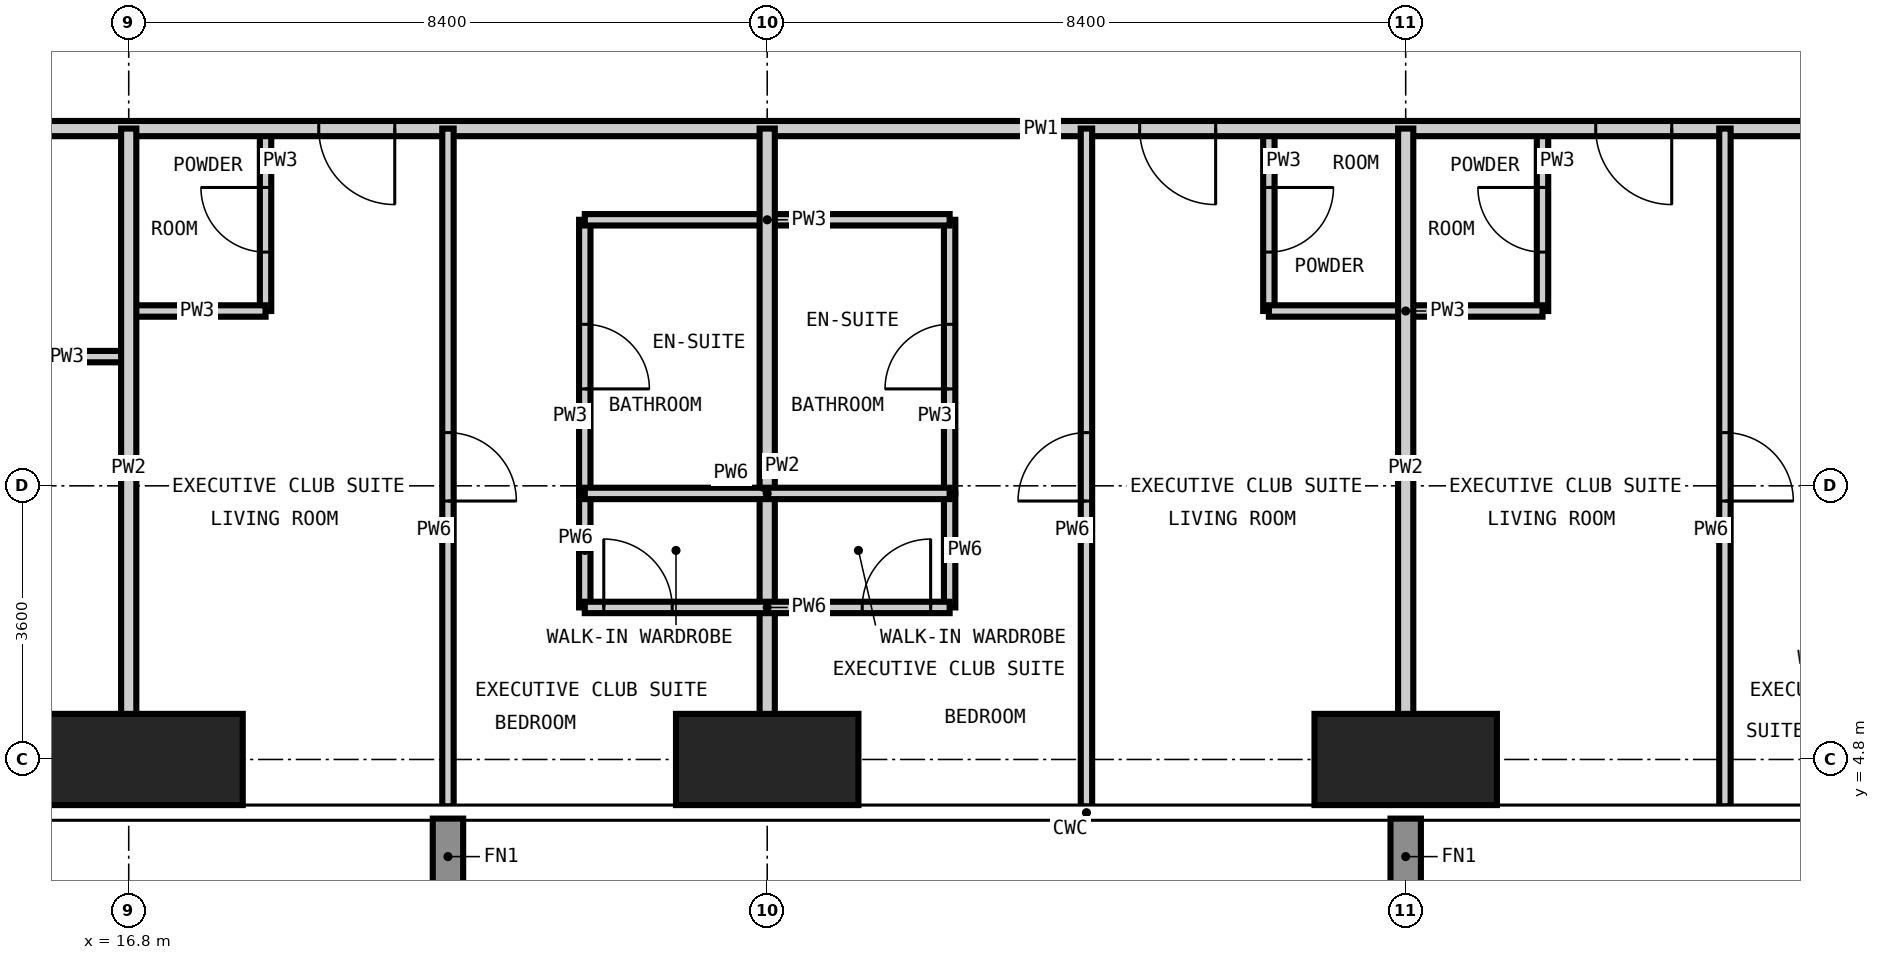
"""IFC4 building model, lengths in metres.
Left out: names, types, materials, properties, quantities, classifications, styles, units other than length and angle.
Written with IfcOpenShell. Run it as: python <this file> out.ifc"""

import sys

from ifc_helpers import new_model, si_unit, direction, frame, frame_2d, origin, origin_2d, place, context, subcontext, project, spatial, rectangle, extrude, element, fill, save


model = new_model("IFC4")
c1 = context("Model", 3, precision=1e-05, world=origin(), true_north=direction((0.0, 1.0)))
c2 = subcontext(c1, "Body", "Model", "MODEL_VIEW")
j1 = project(units=[si_unit("LENGTHUNIT", "METRE"), si_unit("PLANEANGLEUNIT", "RADIAN")], contexts=[c1])
p1 = place(None, origin())
s1 = spatial("IfcSite", under=j1, at=p1, CompositionType="ELEMENT")
p2 = place(p1, origin())
s2 = spatial("IfcBuilding", under=s1, at=p2, CompositionType="ELEMENT")
p3 = place(p2, frame((0.0, 0.0, 216.6)))
s3 = spatial("IfcBuildingStorey", under=s2, at=p3, CompositionType="ELEMENT", Elevation=216.6)
p4 = place(p3, frame((16.8, 4.8, -0.35), z_axis=(0.0, 0.0, 1.0), x_axis=(1.0, 0.0, 0.0)))
e1 = element("IfcColumn", 1, at=p4, inside=s3, PredefinedType="COLUMN", context=c2, shape_type="SweptSolid", body=[
    extrude(rectangle(XDim=3.0, YDim=1.2, at=origin_2d()), origin(), (0.0, 0.0, 1.0), 3.55),
])
for number, where, z_axis, x_axis in (
    (2, (25.2, 4.8, -0.35), (0.0, 0.0, 1.0), (1.0, 0.0, 0.0)),
    (3, (33.6, 4.8, -0.35), (0.0, 0.0, 1.0), (1.0, 0.0, 0.0)),
):
    element("IfcColumn", number, at=place(p3, frame(where, z_axis=z_axis, x_axis=x_axis)), inside=s3, PredefinedType="COLUMN", context=c2, shape_type="SweptSolid", body=[
        extrude(rectangle(XDim=2.4, YDim=1.2, at=origin_2d()), origin(), (0.0, 0.0, 1.0), 3.55),
    ])
p5 = place(p3, frame((18.6, 10.7, 0.0), z_axis=(0.0, 0.0, 1.0), x_axis=(0.0, 1.0, 0.0)))
e4 = element("IfcWall", 4, at=p5, inside=s3, PredefinedType="PARTITIONING", context=c2, shape_type="SweptSolid", body=[
    extrude(rectangle(XDim=2.4, YDim=0.15, at=frame_2d((1.2, 0.0))), origin(), (0.0, 0.0, 1.0), 3.2),
])
p6 = place(p5, frame((0.775, 0.0, 0.0)))
e5 = element("IfcOpeningElement", 5, at=p6, cuts=e4, PredefinedType="OPENING", context=c2, shape_type="SweptSolid", body=[
    extrude(rectangle(XDim=0.85, YDim=2.1, at=frame_2d((0.425, 1.05))), frame((0.0, 0.085, 0.0), z_axis=(0.0, -1.0, 0.0), x_axis=(1.0, 0.0, 0.0)), (0.0, 0.0, 1.0), 0.17),
])
p7 = place(p3, frame((22.8, 8.3, 0.0), z_axis=(0.0, 0.0, 1.0), x_axis=(0.0, 1.0, 0.0)))
e6 = element("IfcWall", 6, at=p7, inside=s3, PredefinedType="PARTITIONING", context=c2, shape_type="SweptSolid", body=[
    extrude(rectangle(XDim=3.6, YDim=0.15, at=frame_2d((1.8, 0.0))), origin(), (0.0, 0.0, 1.0), 3.2),
])
p8 = place(p7, frame((1.375, 0.0, 0.0)))
e7 = element("IfcOpeningElement", 7, at=p8, cuts=e6, PredefinedType="OPENING", context=c2, shape_type="SweptSolid", body=[
    extrude(rectangle(XDim=0.85, YDim=2.1, at=frame_2d((0.425, 1.05))), frame((0.0, 0.085, 0.0), z_axis=(0.0, -1.0, 0.0), x_axis=(1.0, 0.0, 0.0)), (0.0, 0.0, 1.0), 0.17),
])
p9 = place(p3, frame((27.6, 8.3, 0.0), z_axis=(0.0, 0.0, 1.0), x_axis=(0.0, 1.0, 0.0)))
e8 = element("IfcWall", 8, at=p9, inside=s3, PredefinedType="PARTITIONING", context=c2, shape_type="SweptSolid", body=[
    extrude(rectangle(XDim=3.6, YDim=0.15, at=frame_2d((1.8, 0.0))), origin(), (0.0, 0.0, 1.0), 3.2),
])
p10 = place(p9, frame((1.375, 0.0, 0.0)))
e9 = element("IfcOpeningElement", 9, at=p10, cuts=e8, PredefinedType="OPENING", context=c2, shape_type="SweptSolid", body=[
    extrude(rectangle(XDim=0.85, YDim=2.1, at=frame_2d((0.425, 1.05))), frame((0.0, 0.085, 0.0), z_axis=(0.0, -1.0, 0.0), x_axis=(1.0, 0.0, 0.0)), (0.0, 0.0, 1.0), 0.17),
])
p11 = place(p3, frame((31.8, 10.7, 0.0), z_axis=(0.0, 0.0, 1.0), x_axis=(0.0, 1.0, 0.0)))
e10 = element("IfcWall", 10, at=p11, inside=s3, PredefinedType="PARTITIONING", context=c2, shape_type="SweptSolid", body=[
    extrude(rectangle(XDim=2.4, YDim=0.15, at=frame_2d((1.2, 0.0))), origin(), (0.0, 0.0, 1.0), 3.2),
])
p12 = place(p11, frame((0.775, 0.0, 0.0)))
e11 = element("IfcOpeningElement", 11, at=p12, cuts=e10, PredefinedType="OPENING", context=c2, shape_type="SweptSolid", body=[
    extrude(rectangle(XDim=0.85, YDim=2.1, at=frame_2d((0.425, 1.05))), frame((0.0, 0.085, 0.0), z_axis=(0.0, -1.0, 0.0), x_axis=(1.0, 0.0, 0.0)), (0.0, 0.0, 1.0), 0.17),
])
p13 = place(p3, frame((35.4, 10.7, 0.0), z_axis=(0.0, 0.0, 1.0), x_axis=(0.0, 1.0, 0.0)))
e12 = element("IfcWall", 12, at=p13, inside=s3, PredefinedType="PARTITIONING", context=c2, shape_type="SweptSolid", body=[
    extrude(rectangle(XDim=2.4, YDim=0.15, at=frame_2d((1.2, 0.0))), origin(), (0.0, 0.0, 1.0), 3.2),
])
p14 = place(p13, frame((0.775, 0.0, 0.0)))
e13 = element("IfcOpeningElement", 13, at=p14, cuts=e12, PredefinedType="OPENING", context=c2, shape_type="SweptSolid", body=[
    extrude(rectangle(XDim=0.85, YDim=2.1, at=frame_2d((0.425, 1.05))), frame((0.0, 0.085, 0.0), z_axis=(0.0, -1.0, 0.0), x_axis=(1.0, 0.0, 0.0)), (0.0, 0.0, 1.0), 0.17),
])
p15 = place(p3, frame((13.1, 10.1, 0.0), z_axis=(0.0, 0.0, 1.0), x_axis=(1.0, 0.0, 0.0)))
e14 = element("IfcWall", 14, at=p15, inside=s3, PredefinedType="PARTITIONING", context=c2, shape_type="SweptSolid", body=[
    extrude(rectangle(XDim=3.7, YDim=0.15, at=frame_2d((1.85, 0.0))), origin(), (0.0, 0.0, 1.0), 3.2),
])
p16 = place(p15, frame((1.425, 0.0, 0.0)))
e15 = element("IfcOpeningElement", 15, at=p16, cuts=e14, PredefinedType="OPENING", context=c2, shape_type="SweptSolid", body=[
    extrude(rectangle(XDim=0.85, YDim=2.1, at=frame_2d((0.425, 1.05))), frame((0.0, 0.085, 0.0), z_axis=(0.0, -1.0, 0.0), x_axis=(1.0, 0.0, 0.0)), (0.0, 0.0, 1.0), 0.17),
])
p17 = place(p3, frame((16.8, 10.7, 0.0), z_axis=(0.0, 0.0, 1.0), x_axis=(1.0, 0.0, 0.0)))
e16 = element("IfcWall", 16, at=p17, inside=s3, PredefinedType="PARTITIONING", context=c2, shape_type="SweptSolid", body=[
    extrude(rectangle(XDim=1.8, YDim=0.15, at=frame_2d((0.9, 0.0))), origin(), (0.0, 0.0, 1.0), 3.2),
])
p18 = place(p3, frame((31.8, 10.7, 0.0), z_axis=(0.0, 0.0, 1.0), x_axis=(1.0, 0.0, 0.0)))
e17 = element("IfcWall", 17, at=p18, inside=s3, PredefinedType="PARTITIONING", context=c2, shape_type="SweptSolid", body=[
    extrude(rectangle(XDim=3.6, YDim=0.15, at=frame_2d((1.8, 0.0))), origin(), (0.0, 0.0, 1.0), 3.2),
])
p19 = place(p3, frame((22.8, 11.9, 0.0), z_axis=(0.0, 0.0, 1.0), x_axis=(1.0, 0.0, 0.0)))
e18 = element("IfcWall", 18, at=p19, inside=s3, PredefinedType="PARTITIONING", context=c2, shape_type="SweptSolid", body=[
    extrude(rectangle(XDim=4.8, YDim=0.15, at=frame_2d((2.4, 0.0))), origin(), (0.0, 0.0, 1.0), 3.2),
])
p20 = place(p3, frame((44.5, 13.1, 0.0), z_axis=(0.0, 0.0, 1.0), x_axis=(-1.0, 0.0, 0.0)))
e19 = element("IfcWall", 19, at=p20, inside=s3, PredefinedType="PARTITIONING", context=c2, shape_type="SweptSolid", body=[
    extrude(rectangle(XDim=31.4, YDim=0.2, at=frame_2d((15.7, 0.0))), origin(), (0.0, 0.0, 1.0), 3.2),
])
p21 = place(p20, frame((24.2, 0.0, 0.0)))
e20 = element("IfcOpeningElement", 20, at=p21, cuts=e19, PredefinedType="OPENING", context=c2, shape_type="SweptSolid", body=[
    extrude(rectangle(XDim=1.0, YDim=2.2, at=frame_2d((0.5, 1.1))), frame((0.0, 0.11, 0.0), z_axis=(0.0, -1.0, 0.0), x_axis=(1.0, 0.0, 0.0)), (0.0, 0.0, 1.0), 0.22),
])
p22 = place(p20, frame((13.4, 0.0, 0.0)))
e21 = element("IfcOpeningElement", 21, at=p22, cuts=e19, PredefinedType="OPENING", context=c2, shape_type="SweptSolid", body=[
    extrude(rectangle(XDim=1.0, YDim=2.2, at=frame_2d((0.5, 1.1))), frame((0.0, 0.11, 0.0), z_axis=(0.0, -1.0, 0.0), x_axis=(1.0, 0.0, 0.0)), (0.0, 0.0, 1.0), 0.22),
])
p23 = place(p20, frame((7.4, 0.0, 0.0)))
e22 = element("IfcOpeningElement", 22, at=p23, cuts=e19, PredefinedType="OPENING", context=c2, shape_type="SweptSolid", body=[
    extrude(rectangle(XDim=1.0, YDim=2.2, at=frame_2d((0.5, 1.1))), frame((0.0, 0.11, 0.0), z_axis=(0.0, -1.0, 0.0), x_axis=(1.0, 0.0, 0.0)), (0.0, 0.0, 1.0), 0.22),
])
for number, where, z_axis, x_axis in (
    (23, (16.8, 4.182, 0.0), (0.0, 0.0, 1.0), (0.0, 1.0, 0.0)),
    (24, (25.2, 4.182, 0.0), (0.0, 0.0, 1.0), (0.0, 1.0, 0.0)),
    (25, (33.6, 4.182, 0.0), (0.0, 0.0, 1.0), (0.0, 1.0, 0.0)),
):
    element("IfcWall", number, at=place(p3, frame(where, z_axis=z_axis, x_axis=x_axis)), inside=s3, PredefinedType="PARTITIONING", context=c2, shape_type="SweptSolid", body=[
        extrude(rectangle(XDim=8.918, YDim=0.2, at=frame_2d((4.459, 0.0))), origin(), (0.0, 0.0, 1.0), 3.2),
    ])
p24 = place(p3, frame((21.0, 4.182, 0.0), z_axis=(0.0, 0.0, 1.0), x_axis=(0.0, 1.0, 0.0)))
e26 = element("IfcWall", 26, at=p24, inside=s3, PredefinedType="PARTITIONING", context=c2, shape_type="SweptSolid", body=[
    extrude(rectangle(XDim=8.918, YDim=0.15, at=frame_2d((4.459, 0.0))), origin(), (0.0, 0.0, 1.0), 3.2),
])
p25 = place(p24, frame((4.018, 0.0, 0.0)))
e27 = element("IfcOpeningElement", 27, at=p25, cuts=e26, PredefinedType="OPENING", context=c2, shape_type="SweptSolid", body=[
    extrude(rectangle(XDim=0.9, YDim=2.1, at=frame_2d((0.45, 1.05))), frame((0.0, 0.085, 0.0), z_axis=(0.0, -1.0, 0.0), x_axis=(1.0, 0.0, 0.0)), (0.0, 0.0, 1.0), 0.17),
])
for number, where, z_axis, x_axis in (
    (28, (22.8, 6.8, 0.0), (0.0, 0.0, 1.0), (0.0, 1.0, 0.0)),
    (29, (27.6, 6.8, 0.0), (0.0, 0.0, 1.0), (0.0, 1.0, 0.0)),
):
    element("IfcWall", number, at=place(p3, frame(where, z_axis=z_axis, x_axis=x_axis)), inside=s3, PredefinedType="PARTITIONING", context=c2, shape_type="SweptSolid", body=[
        extrude(rectangle(XDim=1.5, YDim=0.15, at=frame_2d((0.75, 0.0))), origin(), (0.0, 0.0, 1.0), 3.2),
    ])
p26 = place(p3, frame((29.4, 4.182, 0.0), z_axis=(0.0, 0.0, 1.0), x_axis=(0.0, 1.0, 0.0)))
e30 = element("IfcWall", 30, at=p26, inside=s3, PredefinedType="PARTITIONING", context=c2, shape_type="SweptSolid", body=[
    extrude(rectangle(XDim=8.918, YDim=0.15, at=frame_2d((4.459, 0.0))), origin(), (0.0, 0.0, 1.0), 3.2),
])
p27 = place(p26, frame((4.018, 0.0, 0.0)))
e31 = element("IfcOpeningElement", 31, at=p27, cuts=e30, PredefinedType="OPENING", context=c2, shape_type="SweptSolid", body=[
    extrude(rectangle(XDim=0.9, YDim=2.1, at=frame_2d((0.45, 1.05))), frame((0.0, 0.085, 0.0), z_axis=(0.0, -1.0, 0.0), x_axis=(1.0, 0.0, 0.0)), (0.0, 0.0, 1.0), 0.17),
])
p28 = place(p3, frame((37.8, 4.182, 0.0), z_axis=(0.0, 0.0, 1.0), x_axis=(0.0, 1.0, 0.0)))
e32 = element("IfcWall", 32, at=p28, inside=s3, PredefinedType="PARTITIONING", context=c2, shape_type="SweptSolid", body=[
    extrude(rectangle(XDim=8.918, YDim=0.15, at=frame_2d((4.459, 0.0))), origin(), (0.0, 0.0, 1.0), 3.2),
])
p29 = place(p28, frame((4.018, 0.0, 0.0)))
e33 = element("IfcOpeningElement", 33, at=p29, cuts=e32, PredefinedType="OPENING", context=c2, shape_type="SweptSolid", body=[
    extrude(rectangle(XDim=0.9, YDim=2.1, at=frame_2d((0.45, 1.05))), frame((0.0, 0.085, 0.0), z_axis=(0.0, -1.0, 0.0), x_axis=(1.0, 0.0, 0.0)), (0.0, 0.0, 1.0), 0.17),
])
p30 = place(p3, frame((22.8, 6.8, 0.0), z_axis=(0.0, 0.0, 1.0), x_axis=(1.0, 0.0, 0.0)))
e34 = element("IfcWall", 34, at=p30, inside=s3, PredefinedType="PARTITIONING", context=c2, shape_type="SweptSolid", body=[
    extrude(rectangle(XDim=4.8, YDim=0.15, at=frame_2d((2.4, 0.0))), origin(), (0.0, 0.0, 1.0), 3.2),
])
p31 = place(p30, frame((0.25, 0.0, 0.0)))
e35 = element("IfcOpeningElement", 35, at=p31, cuts=e34, PredefinedType="OPENING", context=c2, shape_type="SweptSolid", body=[
    extrude(rectangle(XDim=0.9, YDim=2.1, at=frame_2d((0.45, 1.05))), frame((0.0, 0.085, 0.0), z_axis=(0.0, -1.0, 0.0), x_axis=(1.0, 0.0, 0.0)), (0.0, 0.0, 1.0), 0.17),
])
p32 = place(p30, frame((3.65, 0.0, 0.0)))
e36 = element("IfcOpeningElement", 36, at=p32, cuts=e34, PredefinedType="OPENING", context=c2, shape_type="SweptSolid", body=[
    extrude(rectangle(XDim=0.9, YDim=2.1, at=frame_2d((0.45, 1.05))), frame((0.0, 0.085, 0.0), z_axis=(0.0, -1.0, 0.0), x_axis=(1.0, 0.0, 0.0)), (0.0, 0.0, 1.0), 0.17),
])
p33 = place(p3, frame((22.8, 8.3, 0.0), z_axis=(0.0, 0.0, 1.0), x_axis=(1.0, 0.0, 0.0)))
e37 = element("IfcWall", 37, at=p33, inside=s3, PredefinedType="PARTITIONING", context=c2, shape_type="SweptSolid", body=[
    extrude(rectangle(XDim=4.8, YDim=0.15, at=frame_2d((2.4, 0.0))), origin(), (0.0, 0.0, 1.0), 3.2),
])
p34 = place(p21, origin())
e38 = element("IfcDoor", 38, at=p34, inside=s3, OperationType="SINGLE_SWING_LEFT", PredefinedType="DOOR", context=c2, shape_type="SweptSolid", body=[
    extrude(rectangle(XDim=1.0, YDim=2.2, at=frame_2d((0.5, 1.1))), frame((0.0, 0.025, 0.0), z_axis=(0.0, -1.0, 0.0), x_axis=(1.0, 0.0, 0.0)), (0.0, 0.0, 1.0), 0.05),
])
fill(e20, e38)
p35 = place(p6, origin())
e39 = element("IfcDoor", 39, at=p35, inside=s3, OperationType="SINGLE_SWING_RIGHT", PredefinedType="DOOR", context=c2, shape_type="SweptSolid", body=[
    extrude(rectangle(XDim=0.85, YDim=2.1, at=frame_2d((0.425, 1.05))), frame((0.0, 0.025, 0.0), z_axis=(0.0, -1.0, 0.0), x_axis=(1.0, 0.0, 0.0)), (0.0, 0.0, 1.0), 0.05),
])
fill(e5, e39)
p36 = place(p25, frame((0.9, 0.0, 0.0), z_axis=(0.0, 0.0, 1.0), x_axis=(-1.0, 0.0, 0.0)))
e40 = element("IfcDoor", 40, at=p36, inside=s3, OperationType="SINGLE_SWING_RIGHT", PredefinedType="DOOR", context=c2, shape_type="SweptSolid", body=[
    extrude(rectangle(XDim=0.9, YDim=2.1, at=frame_2d((0.45, 1.05))), frame((0.0, 0.025, 0.0), z_axis=(0.0, -1.0, 0.0), x_axis=(1.0, 0.0, 0.0)), (0.0, 0.0, 1.0), 0.05),
])
fill(e27, e40)
p37 = place(p8, frame((0.85, 0.0, 0.0), z_axis=(0.0, 0.0, 1.0), x_axis=(-1.0, 0.0, 0.0)))
e41 = element("IfcDoor", 41, at=p37, inside=s3, OperationType="SINGLE_SWING_RIGHT", PredefinedType="DOOR", context=c2, shape_type="SweptSolid", body=[
    extrude(rectangle(XDim=0.85, YDim=2.1, at=frame_2d((0.425, 1.05))), frame((0.0, 0.025, 0.0), z_axis=(0.0, -1.0, 0.0), x_axis=(1.0, 0.0, 0.0)), (0.0, 0.0, 1.0), 0.05),
])
fill(e7, e41)
p38 = place(p31, origin())
e42 = element("IfcDoor", 42, at=p38, inside=s3, OperationType="SINGLE_SWING_LEFT", PredefinedType="DOOR", context=c2, shape_type="SweptSolid", body=[
    extrude(rectangle(XDim=0.9, YDim=2.1, at=frame_2d((0.45, 1.05))), frame((0.0, 0.025, 0.0), z_axis=(0.0, -1.0, 0.0), x_axis=(1.0, 0.0, 0.0)), (0.0, 0.0, 1.0), 0.05),
])
fill(e35, e42)
p39 = place(p22, origin())
e43 = element("IfcDoor", 43, at=p39, inside=s3, OperationType="SINGLE_SWING_LEFT", PredefinedType="DOOR", context=c2, shape_type="SweptSolid", body=[
    extrude(rectangle(XDim=1.0, YDim=2.2, at=frame_2d((0.5, 1.1))), frame((0.0, 0.025, 0.0), z_axis=(0.0, -1.0, 0.0), x_axis=(1.0, 0.0, 0.0)), (0.0, 0.0, 1.0), 0.05),
])
fill(e21, e43)
p40 = place(p12, frame((0.85, 0.0, 0.0), z_axis=(0.0, 0.0, 1.0), x_axis=(-1.0, 0.0, 0.0)))
e44 = element("IfcDoor", 44, at=p40, inside=s3, OperationType="SINGLE_SWING_LEFT", PredefinedType="DOOR", context=c2, shape_type="SweptSolid", body=[
    extrude(rectangle(XDim=0.85, YDim=2.1, at=frame_2d((0.425, 1.05))), frame((0.0, 0.025, 0.0), z_axis=(0.0, -1.0, 0.0), x_axis=(1.0, 0.0, 0.0)), (0.0, 0.0, 1.0), 0.05),
])
fill(e11, e44)
p41 = place(p27, origin())
e45 = element("IfcDoor", 45, at=p41, inside=s3, OperationType="SINGLE_SWING_LEFT", PredefinedType="DOOR", context=c2, shape_type="SweptSolid", body=[
    extrude(rectangle(XDim=0.9, YDim=2.1, at=frame_2d((0.45, 1.05))), frame((0.0, 0.025, 0.0), z_axis=(0.0, -1.0, 0.0), x_axis=(1.0, 0.0, 0.0)), (0.0, 0.0, 1.0), 0.05),
])
fill(e31, e45)
p42 = place(p10, origin())
e46 = element("IfcDoor", 46, at=p42, inside=s3, OperationType="SINGLE_SWING_LEFT", PredefinedType="DOOR", context=c2, shape_type="SweptSolid", body=[
    extrude(rectangle(XDim=0.85, YDim=2.1, at=frame_2d((0.425, 1.05))), frame((0.0, 0.025, 0.0), z_axis=(0.0, -1.0, 0.0), x_axis=(1.0, 0.0, 0.0)), (0.0, 0.0, 1.0), 0.05),
])
fill(e9, e46)
p43 = place(p32, origin())
e47 = element("IfcDoor", 47, at=p43, inside=s3, OperationType="SINGLE_SWING_RIGHT", PredefinedType="DOOR", context=c2, shape_type="SweptSolid", body=[
    extrude(rectangle(XDim=0.9, YDim=2.1, at=frame_2d((0.45, 1.05))), frame((0.0, 0.025, 0.0), z_axis=(0.0, -1.0, 0.0), x_axis=(1.0, 0.0, 0.0)), (0.0, 0.0, 1.0), 0.05),
])
fill(e36, e47)
p44 = place(p23, origin())
e48 = element("IfcDoor", 48, at=p44, inside=s3, OperationType="SINGLE_SWING_LEFT", PredefinedType="DOOR", context=c2, shape_type="SweptSolid", body=[
    extrude(rectangle(XDim=1.0, YDim=2.2, at=frame_2d((0.5, 1.1))), frame((0.0, 0.025, 0.0), z_axis=(0.0, -1.0, 0.0), x_axis=(1.0, 0.0, 0.0)), (0.0, 0.0, 1.0), 0.05),
])
fill(e22, e48)
p45 = place(p14, origin())
e49 = element("IfcDoor", 49, at=p45, inside=s3, OperationType="SINGLE_SWING_RIGHT", PredefinedType="DOOR", context=c2, shape_type="SweptSolid", body=[
    extrude(rectangle(XDim=0.85, YDim=2.1, at=frame_2d((0.425, 1.05))), frame((0.0, 0.025, 0.0), z_axis=(0.0, -1.0, 0.0), x_axis=(1.0, 0.0, 0.0)), (0.0, 0.0, 1.0), 0.05),
])
fill(e13, e49)
p46 = place(p29, frame((0.9, 0.0, 0.0), z_axis=(0.0, 0.0, 1.0), x_axis=(-1.0, 0.0, 0.0)))
e50 = element("IfcDoor", 50, at=p46, inside=s3, OperationType="SINGLE_SWING_RIGHT", PredefinedType="DOOR", context=c2, shape_type="SweptSolid", body=[
    extrude(rectangle(XDim=0.9, YDim=2.1, at=frame_2d((0.45, 1.05))), frame((0.0, 0.025, 0.0), z_axis=(0.0, -1.0, 0.0), x_axis=(1.0, 0.0, 0.0)), (0.0, 0.0, 1.0), 0.05),
])
fill(e33, e50)
save(model, sys.argv[1])
